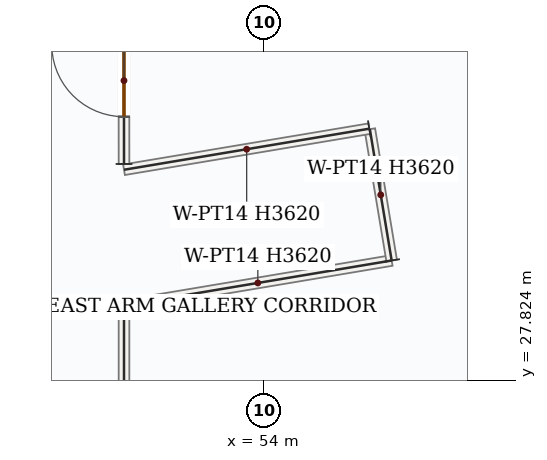
"""IFC4 building model, lengths in metres.
Left out: names, types, materials, properties, quantities, classifications, styles, units other than length and angle.
Written with IfcOpenShell. Run it as: python <this file> out.ifc"""

import sys

from ifc_helpers import new_model, si_unit, direction, frame, frame_2d, origin, place, context, subcontext, project, spatial, rectangle, extrude, source, transform, mapped, element, fill, save


model = new_model("IFC4")
c1 = context("Model", 3, precision=1e-05, world=origin(), true_north=direction((0.0, 1.0)))
c2 = subcontext(c1, "Body", "Model", "MODEL_VIEW")
j1 = project(units=[si_unit("LENGTHUNIT", "METRE"), si_unit("PLANEANGLEUNIT", "RADIAN")], contexts=[c1])
p1 = place(None, origin())
s1 = spatial("IfcSite", under=j1, at=p1, CompositionType="ELEMENT")
p2 = place(p1, origin())
s2 = spatial("IfcBuilding", under=s1, at=p2, CompositionType="ELEMENT")
p3 = place(p2, frame((0.0, 0.0, 143.4)))
s3 = spatial("IfcBuildingStorey", under=s2, at=p3, CompositionType="ELEMENT", Elevation=143.4)
m1 = source(origin(), c2, "Body", "SweptSolid", [
    extrude(rectangle(XDim=8.203, YDim=0.14, at=frame_2d((4.101, 0.0))), origin(), (0.0, 0.0, 1.0), 2.766),
])
p4 = place(p3, frame((52.15, 20.608, 0.0), z_axis=(0.0, 0.0, 1.0), x_axis=(2.9763676e-05, 0.999999999557, 0.0)))
e1 = element("IfcWall", 1, at=p4, inside=s3, PredefinedType="PARTITIONING", context=c2, shape_type="MappedRepresentation", body=[
    mapped(m1, transform((0.0, 0.0, 0.0), x_axis=(1.0, 0.0, 0.0), y_axis=(0.0, 1.0, 0.0), z_axis=(0.0, 0.0, 1.0), scale=1.0)),
])
m2 = source(origin(), c2, "Body", "SweptSolid", [
    extrude(rectangle(XDim=3.57, YDim=0.14, at=frame_2d((1.785, 0.0))), origin(), (0.0, 0.0, 1.0), 3.62),
])
p5 = place(p3, frame((52.15, 28.81, 0.0), z_axis=(0.0, 0.0, 1.0), x_axis=(0.98622523321, 0.165407948356, 0.0)))
e2 = element("IfcWall", 2, at=p5, inside=s3, PredefinedType="PARTITIONING", context=c2, shape_type="MappedRepresentation", body=[
    mapped(m2, transform((0.0, 0.0, 0.0), x_axis=(1.0, 0.0, 0.0), y_axis=(0.0, 1.0, 0.0), z_axis=(0.0, 0.0, 1.0), scale=1.0)),
])
m3 = source(origin(), c2, "Body", "SweptSolid", [
    extrude(rectangle(XDim=1.751, YDim=0.14, at=frame_2d((0.875, 0.0))), origin(), (0.0, 0.0, 1.0), 3.62),
])
p6 = place(p3, frame((55.671, 29.401, 0.0), z_axis=(0.0, 0.0, 1.0), x_axis=(-0.163946827652, 0.986469177269, 0.0)))
e3 = element("IfcWall", 3, at=p6, inside=s3, PredefinedType="PARTITIONING", context=c2, shape_type="MappedRepresentation", body=[
    mapped(m3, transform((0.0, 0.0, 0.0), x_axis=(1.0, 0.0, 0.0), y_axis=(0.0, 1.0, 0.0), z_axis=(0.0, 0.0, 1.0), scale=1.0)),
])
m4 = source(origin(), c2, "Body", "SweptSolid", [
    extrude(rectangle(XDim=3.272, YDim=0.14, at=frame_2d((1.636, 0.0))), origin(), (0.0, 0.0, 1.0), 3.62),
])
p7 = place(p3, frame((55.377, 31.135, 0.0), z_axis=(0.0, 0.0, 1.0), x_axis=(-0.986274692216, -0.165112784165, 0.0)))
e4 = element("IfcWall", 4, at=p7, inside=s3, PredefinedType="PARTITIONING", context=c2, shape_type="MappedRepresentation", body=[
    mapped(m4, transform((0.0, 0.0, 0.0), x_axis=(1.0, 0.0, 0.0), y_axis=(0.0, 1.0, 0.0), z_axis=(0.0, 0.0, 1.0), scale=1.0)),
])
p8 = place(p3, frame((52.15, 30.671, 0.0), z_axis=(0.0, 0.0, 1.0), x_axis=(-0.000447667607, 0.999999899797, 0.0)))
e5 = element("IfcWall", 5, at=p8, inside=s3, PredefinedType="PARTITIONING", context=c2, shape_type="SweptSolid", body=[
    extrude(rectangle(XDim=2.727, YDim=0.14, at=frame_2d((1.363, 0.0))), origin(), (0.0, 0.0, 1.0), 3.149),
])
p9 = place(p8, frame((0.622, 0.0, 0.0)))
e6 = element("IfcOpeningElement", 6, at=p9, cuts=e5, PredefinedType="OPENING", context=c2, shape_type="SweptSolid", body=[
    extrude(rectangle(XDim=0.95, YDim=2.15, at=frame_2d((0.475, 1.075))), frame((0.0, 0.08, 0.0), z_axis=(0.0, -1.0, 0.0), x_axis=(1.0, 0.0, 0.0)), (0.0, 0.0, 1.0), 0.16),
])
m5 = source(origin(), c2, "Body", "SweptSolid", [
    extrude(rectangle(XDim=0.95, YDim=2.15, at=frame_2d((0.475, 1.075))), frame((0.0, 0.025, 0.0), z_axis=(0.0, -1.0, 0.0), x_axis=(1.0, 0.0, 0.0)), (0.0, 0.0, 1.0), 0.05),
])
p10 = place(p9, origin())
e7 = element("IfcDoor", 7, at=p10, inside=s3, OperationType="SINGLE_SWING_RIGHT", PredefinedType="DOOR", context=c2, shape_type="MappedRepresentation", body=[
    mapped(m5, transform((0.0, 0.0, 0.0), x_axis=(1.0, 0.0, 0.0), y_axis=(0.0, 1.0, 0.0), z_axis=(0.0, 0.0, 1.0), scale=1.0)),
])
fill(e6, e7)
save(model, sys.argv[1])
